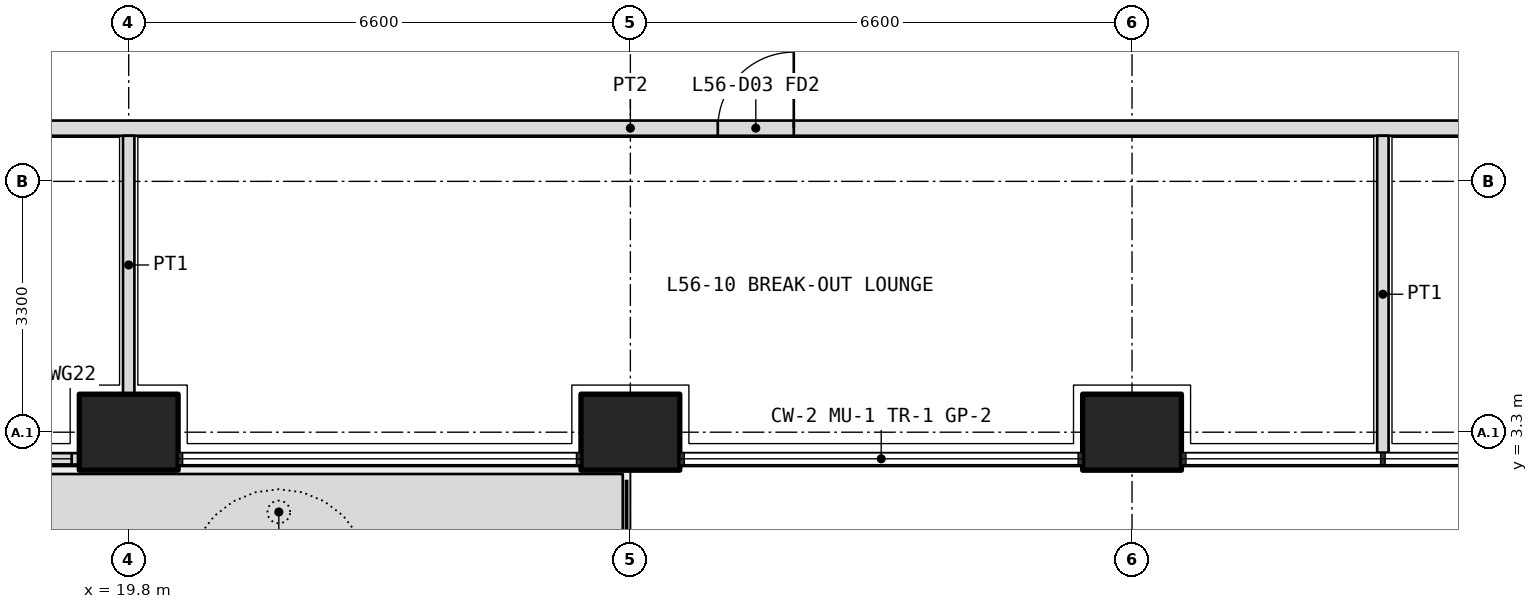
"""IFC4 building model, lengths in metres.
Left out: names, types, materials, properties, quantities, classifications, styles, units other than length and angle.
Written with IfcOpenShell. Run it as: python <this file> out.ifc"""

import sys

from ifc_helpers import new_model, si_unit, direction, frame, frame_2d, origin, origin_2d, place, context, subcontext, project, spatial, polyline, rectangle, outline, extrude, element, fill, save


model = new_model("IFC4")
c1 = context("Model", 3, precision=1e-05, world=origin(), true_north=direction((0.0, 1.0)))
c2 = subcontext(c1, "Body", "Model", "MODEL_VIEW")
j1 = project(units=[si_unit("LENGTHUNIT", "METRE"), si_unit("PLANEANGLEUNIT", "RADIAN")], contexts=[c1])
p1 = place(None, origin())
s1 = spatial("IfcSite", under=j1, at=p1, CompositionType="ELEMENT")
p2 = place(p1, origin())
s2 = spatial("IfcBuilding", under=s1, at=p2, CompositionType="ELEMENT")
p3 = place(p2, frame((0.0, 0.0, 246.0)))
s3 = spatial("IfcBuildingStorey", under=s2, at=p3, CompositionType="ELEMENT", Elevation=246.0)
for number, where, z_axis, x_axis in (
    (1, (19.8, 3.3, 0.0), (0.0, 0.0, 1.0), (1.0, 0.0, 0.0)),
    (2, (26.4, 3.3, 0.0), (0.0, 0.0, 1.0), (1.0, 0.0, 0.0)),
    (3, (33.0, 3.3, 0.0), (0.0, 0.0, 1.0), (1.0, 0.0, 0.0)),
):
    element("IfcColumn", number, at=place(p3, frame(where, z_axis=z_axis, x_axis=x_axis)), inside=s3, PredefinedType="COLUMN", context=c2, shape_type="SweptSolid", body=[
        extrude(rectangle(XDim=1.3, YDim=1.0, at=origin_2d()), origin(), (0.0, 0.0, 1.0), 4.2),
    ])
p4 = place(p3, origin())
e4 = element("IfcWall", 4, at=p4, inside=s3, PredefinedType="USERDEFINED", context=c2, shape_type="SweptSolid", body=[
    extrude(outline(polyline([(17.25, 1.75), (26.3, 1.75), (26.3, 2.75), (17.25, 2.75), (17.25, 1.75)]), holes=[polyline([(17.4, 1.9), (26.15, 1.9), (26.15, 2.6), (17.4, 2.6), (17.4, 1.9)])]), origin(), (0.0, 0.0, 1.0), 1.05),
])
p5 = place(p3, frame((13.85, 2.95, 0.0), z_axis=(0.0, 0.0, 1.0), x_axis=(1.0, 0.0, 0.0)))
e5 = element("IfcWall", 5, at=p5, inside=s3, PredefinedType="SOLIDWALL", context=c2, shape_type="SweptSolid", body=[
    extrude(rectangle(XDim=5.3, YDim=0.15, at=frame_2d((2.65, 0.0))), origin(), (0.0, 0.0, 1.0), 2.7),
])
p6 = place(p5, frame((2.9, 0.0, 0.0)))
e6 = element("IfcOpeningElement", 6, at=p6, cuts=e5, PredefinedType="OPENING", context=c2, shape_type="SweptSolid", body=[
    extrude(rectangle(XDim=1.0, YDim=2.4, at=frame_2d((0.5, 1.2))), frame((0.0, 0.085, 0.0), z_axis=(0.0, -1.0, 0.0), x_axis=(1.0, 0.0, 0.0)), (0.0, 0.0, 1.0), 0.17),
])
p7 = place(p5, frame((0.1, 0.0, 0.1)))
e7 = element("IfcOpeningElement", 7, at=p7, cuts=e5, PredefinedType="OPENING", context=c2, shape_type="SweptSolid", body=[
    extrude(rectangle(XDim=2.3, YDim=2.3, at=frame_2d((1.15, 1.15))), frame((0.0, 0.085, 0.0), z_axis=(0.0, -1.0, 0.0), x_axis=(1.0, 0.0, 0.0)), (0.0, 0.0, 1.0), 0.17),
])
p8 = place(p5, frame((4.0, 0.0, 0.1)))
e8 = element("IfcOpeningElement", 8, at=p8, cuts=e5, PredefinedType="OPENING", context=c2, shape_type="SweptSolid", body=[
    extrude(rectangle(XDim=1.2, YDim=2.3, at=frame_2d((0.6, 1.15))), frame((0.0, 0.085, 0.0), z_axis=(0.0, -1.0, 0.0), x_axis=(1.0, 0.0, 0.0)), (0.0, 0.0, 1.0), 0.17),
])
p9 = place(p3, frame((10.975, 7.3, 0.0), z_axis=(0.0, 0.0, 1.0), x_axis=(1.0, 0.0, 0.0)))
e9 = element("IfcWall", 9, at=p9, inside=s3, PredefinedType="PARTITIONING", context=c2, shape_type="SweptSolid", body=[
    extrude(rectangle(XDim=30.85, YDim=0.2, at=frame_2d((15.425, 0.0))), origin(), (0.0, 0.0, 1.0), 3.0),
])
p10 = place(p9, frame((3.863, 0.0, 0.0)))
e10 = element("IfcOpeningElement", 10, at=p10, cuts=e9, PredefinedType="OPENING", context=c2, shape_type="SweptSolid", body=[
    extrude(rectangle(XDim=1.2, YDim=2.1, at=frame_2d((0.6, 1.05))), frame((0.0, 0.11, 0.0), z_axis=(0.0, -1.0, 0.0), x_axis=(1.0, 0.0, 0.0)), (0.0, 0.0, 1.0), 0.22),
])
p11 = place(p9, frame((16.575, 0.0, 0.0)))
e11 = element("IfcOpeningElement", 11, at=p11, cuts=e9, PredefinedType="OPENING", context=c2, shape_type="SweptSolid", body=[
    extrude(rectangle(XDim=1.0, YDim=2.1, at=frame_2d((0.5, 1.05))), frame((0.0, 0.11, 0.0), z_axis=(0.0, -1.0, 0.0), x_axis=(1.0, 0.0, 0.0)), (0.0, 0.0, 1.0), 0.22),
])
p12 = place(p9, frame((27.538, 0.0, 0.0)))
e12 = element("IfcOpeningElement", 12, at=p12, cuts=e9, PredefinedType="OPENING", context=c2, shape_type="SweptSolid", body=[
    extrude(rectangle(XDim=1.0, YDim=2.1, at=frame_2d((0.5, 1.05))), frame((0.0, 0.11, 0.0), z_axis=(0.0, -1.0, 0.0), x_axis=(1.0, 0.0, 0.0)), (0.0, 0.0, 1.0), 0.22),
])
p13 = place(p3, frame((19.8, 3.8, 0.0), z_axis=(0.0, 0.0, 1.0), x_axis=(0.0, 1.0, 0.0)))
e13 = element("IfcWall", 13, at=p13, inside=s3, PredefinedType="PARTITIONING", context=c2, shape_type="SweptSolid", body=[
    extrude(rectangle(XDim=3.4, YDim=0.15, at=frame_2d((1.7, 0.0))), origin(), (0.0, 0.0, 1.0), 3.0),
])
p14 = place(p3, frame((36.3, 3.03, 0.0), z_axis=(0.0, 0.0, 1.0), x_axis=(0.0, 1.0, 0.0)))
e14 = element("IfcWall", 14, at=p14, inside=s3, PredefinedType="PARTITIONING", context=c2, shape_type="SweptSolid", body=[
    extrude(rectangle(XDim=4.17, YDim=0.15, at=frame_2d((2.085, 0.0))), origin(), (0.0, 0.0, 1.0), 2.7),
])
p15 = place(p8, origin())
e15 = element("IfcWindow", 15, at=p15, inside=s3, PartitioningType="SINGLE_PANEL", PredefinedType="WINDOW", context=c2, shape_type="SweptSolid", body=[
    extrude(rectangle(XDim=1.2, YDim=2.3, at=frame_2d((0.6, 1.15))), frame((0.0, 0.03, 0.0), z_axis=(0.0, -1.0, 0.0), x_axis=(1.0, 0.0, 0.0)), (0.0, 0.0, 1.0), 0.06),
])
fill(e8, e15)
p16 = place(p11, origin())
e16 = element("IfcDoor", 16, at=p16, inside=s3, OperationType="SINGLE_SWING_RIGHT", PredefinedType="DOOR", context=c2, shape_type="SweptSolid", body=[
    extrude(rectangle(XDim=1.0, YDim=2.1, at=frame_2d((0.5, 1.05))), frame((0.0, 0.025, 0.0), z_axis=(0.0, -1.0, 0.0), x_axis=(1.0, 0.0, 0.0)), (0.0, 0.0, 1.0), 0.05),
])
fill(e11, e16)
save(model, sys.argv[1])
